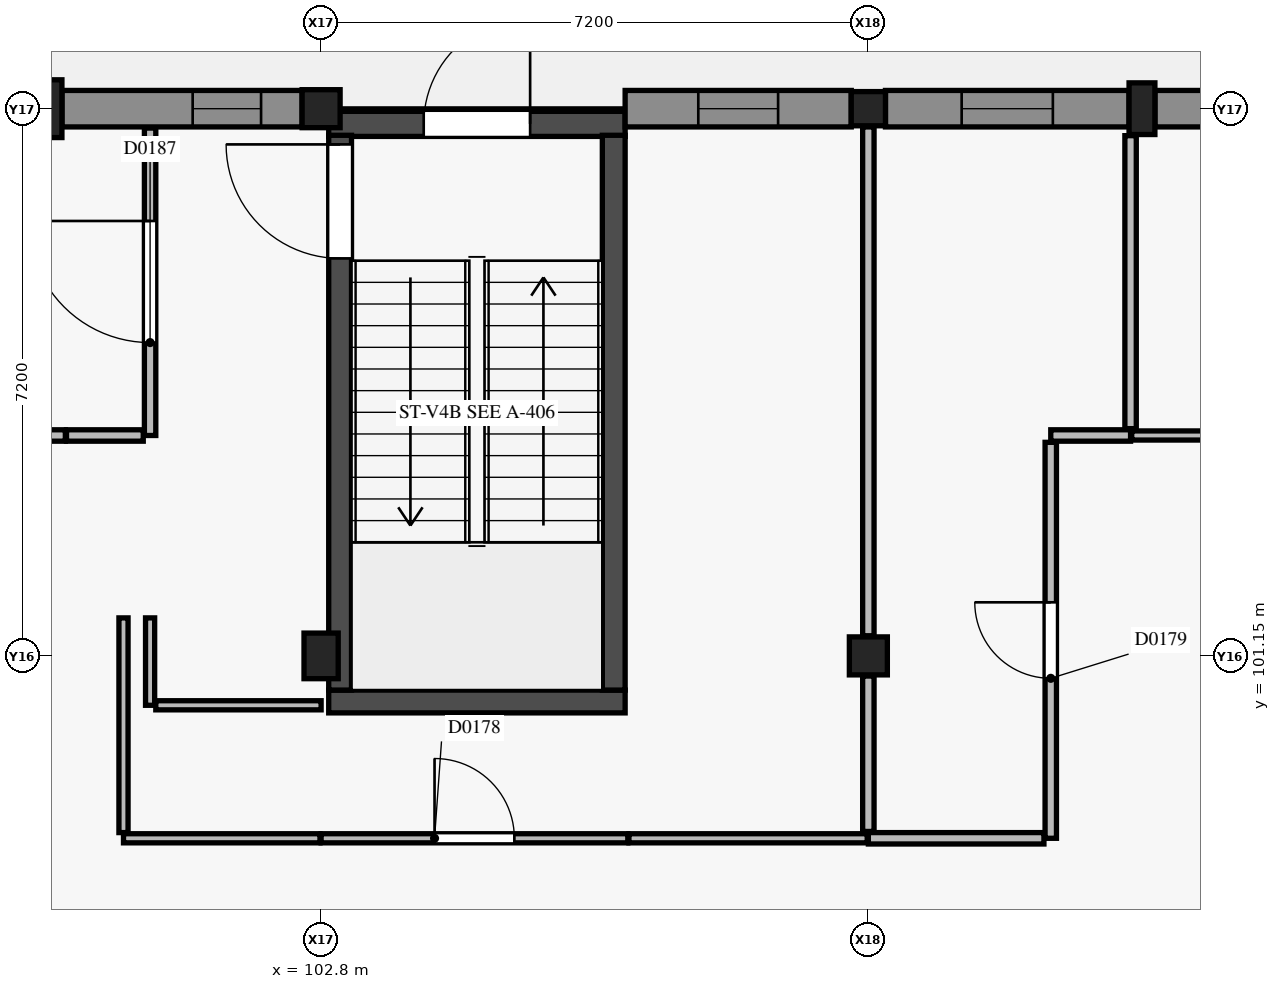
"""IFC4 building model, lengths in metres.
Left out: names, types, materials, properties, quantities, classifications, styles, units other than length and angle.
Written with IfcOpenShell. Run it as: python <this file> out.ifc"""

import sys

from ifc_helpers import new_model, si_unit, direction, frame, frame_2d, origin, origin_2d, place, context, subcontext, project, spatial, rectangle, circle, extrude, element, fill, save


model = new_model("IFC4")
c1 = context("Model", 3, precision=1e-05, world=origin(), true_north=direction((0.0, 1.0)))
c2 = subcontext(c1, "Body", "Model", "MODEL_VIEW")
j1 = project(units=[si_unit("LENGTHUNIT", "METRE"), si_unit("PLANEANGLEUNIT", "RADIAN")], contexts=[c1])
p1 = place(None, origin())
s1 = spatial("IfcSite", under=j1, at=p1, CompositionType="ELEMENT")
p2 = place(p1, origin())
s2 = spatial("IfcBuilding", under=s1, at=p2, CompositionType="ELEMENT")
p3 = place(p2, origin())
s3 = spatial("IfcBuildingStorey", under=s2, at=p3, CompositionType="ELEMENT", Elevation=0.0)
p4 = place(p3, frame((102.8, 101.15, 0.0), z_axis=(0.0, 0.0, 1.0), x_axis=(1.0, 0.0, 0.0)))
e1 = element("IfcColumn", 1, at=p4, inside=s3, PredefinedType="COLUMN", context=c2, shape_type="SweptSolid", body=[
    extrude(rectangle(XDim=0.45, YDim=0.6, at=origin_2d()), origin(), (0.0, 0.0, 1.0), 4.8),
])
p5 = place(p3, frame((102.8, 108.35, 0.0), z_axis=(0.0, 0.0, 1.0), x_axis=(1.0, 0.0, 0.0)))
e2 = element("IfcColumn", 2, at=p5, inside=s3, PredefinedType="COLUMN", context=c2, shape_type="SweptSolid", body=[
    extrude(circle(Radius=0.25, at=origin_2d()), origin(), (0.0, 0.0, 1.0), 4.8),
])
p6 = place(p3, frame((110.0, 101.15, 0.0), z_axis=(0.0, 0.0, 1.0), x_axis=(1.0, 0.0, 0.0)))
e3 = element("IfcColumn", 3, at=p6, inside=s3, PredefinedType="COLUMN", context=c2, shape_type="SweptSolid", body=[
    extrude(rectangle(XDim=0.5, YDim=0.5, at=origin_2d()), origin(), (0.0, 0.0, 1.0), 4.8),
])
p7 = place(p3, frame((110.0, 108.35, 0.0), z_axis=(0.0, 0.0, 1.0), x_axis=(1.0, 0.0, 0.0)))
e4 = element("IfcColumn", 4, at=p7, inside=s3, PredefinedType="COLUMN", context=c2, shape_type="SweptSolid", body=[
    extrude(rectangle(XDim=0.45, YDim=0.45, at=origin_2d()), origin(), (0.0, 0.0, 1.0), 4.8),
])
p8 = place(p3, frame((99.2, 108.35, 0.0), z_axis=(0.0, 0.0, 1.0), x_axis=(1.0, 0.0, 0.0)))
e5 = element("IfcColumn", 5, at=p8, inside=s3, PredefinedType="PILASTER", context=c2, shape_type="SweptSolid", body=[
    extrude(rectangle(XDim=0.38, YDim=0.76, at=origin_2d()), origin(), (0.0, 0.0, 1.0), 4.8),
])
p9 = place(p3, frame((113.6, 108.35, 0.0), z_axis=(0.0, 0.0, 1.0), x_axis=(1.0, 0.0, 0.0)))
e6 = element("IfcColumn", 6, at=p9, inside=s3, PredefinedType="PILASTER", context=c2, shape_type="SweptSolid", body=[
    extrude(rectangle(XDim=0.34, YDim=0.68, at=origin_2d()), origin(), (0.0, 0.0, 1.0), 4.8),
])
p10 = place(p3, frame((102.9, 100.55, 0.0), z_axis=(0.0, 0.0, 1.0), x_axis=(1.0, 0.0, 0.0)))
e7 = element("IfcWall", 7, at=p10, inside=s3, PredefinedType="SHEAR", context=c2, shape_type="SweptSolid", body=[
    extrude(rectangle(XDim=3.9, YDim=0.3, at=frame_2d((1.95, 0.0))), origin(), (0.0, 0.0, 1.0), 4.55),
])
p11 = place(p3, frame((102.9, 108.15, 0.0), z_axis=(0.0, 0.0, 1.0), x_axis=(1.0, 0.0, 0.0)))
e8 = element("IfcWall", 8, at=p11, inside=s3, PredefinedType="SHEAR", context=c2, shape_type="SweptSolid", body=[
    extrude(rectangle(XDim=3.9, YDim=0.33, at=frame_2d((1.95, 0.0))), origin(), (0.0, 0.0, 1.0), 4.55),
])
p12 = place(p11, frame((1.25, 0.0, 0.0)))
e9 = element("IfcOpeningElement", 9, at=p12, cuts=e8, PredefinedType="OPENING", context=c2, shape_type="SweptSolid", body=[
    extrude(rectangle(XDim=1.4, YDim=2.25, at=frame_2d((0.7, 1.125))), frame((0.0, 0.175, 0.0), z_axis=(0.0, -1.0, 0.0), x_axis=(1.0, 0.0, 0.0)), (0.0, 0.0, 1.0), 0.35),
])
p13 = place(p3, frame((103.05, 100.7, 0.0), z_axis=(0.0, 0.0, 1.0), x_axis=(0.0, 1.0, 0.0)))
e10 = element("IfcWall", 10, at=p13, inside=s3, PredefinedType="SHEAR", context=c2, shape_type="SweptSolid", body=[
    extrude(rectangle(XDim=7.3, YDim=0.3, at=frame_2d((3.65, 0.0))), origin(), (0.0, 0.0, 1.0), 4.55),
])
p14 = place(p13, frame((5.68, 0.0, 0.0)))
e11 = element("IfcOpeningElement", 11, at=p14, cuts=e10, PredefinedType="OPENING", context=c2, shape_type="SweptSolid", body=[
    extrude(rectangle(XDim=1.5, YDim=2.15, at=frame_2d((0.75, 1.075))), frame((0.0, 0.16, 0.0), z_axis=(0.0, -1.0, 0.0), x_axis=(1.0, 0.0, 0.0)), (0.0, 0.0, 1.0), 0.32),
])
p15 = place(p3, frame((106.65, 100.7, 0.0), z_axis=(0.0, 0.0, 1.0), x_axis=(0.0, 1.0, 0.0)))
e12 = element("IfcWall", 12, at=p15, inside=s3, PredefinedType="SHEAR", context=c2, shape_type="SweptSolid", body=[
    extrude(rectangle(XDim=7.3, YDim=0.3, at=frame_2d((3.65, 0.0))), origin(), (0.0, 0.0, 1.0), 4.55),
])
p16 = place(p3, frame((99.39, 108.35, 0.0), z_axis=(0.0, 0.0, 1.0), x_axis=(1.0, 0.0, 0.0)))
e13 = element("IfcWall", 13, at=p16, inside=s3, PredefinedType="SOLIDWALL", context=c2, shape_type="SweptSolid", body=[
    extrude(rectangle(XDim=3.16, YDim=0.48, at=frame_2d((1.58, 0.0))), origin(), (0.0, 0.0, 1.0), 3.73),
])
p17 = place(p16, frame((1.72, 0.0, 0.9)))
e14 = element("IfcOpeningElement", 14, at=p17, cuts=e13, PredefinedType="OPENING", context=c2, shape_type="SweptSolid", body=[
    extrude(rectangle(XDim=0.9, YDim=1.8, at=frame_2d((0.45, 0.9))), frame((0.0, 0.25, 0.0), z_axis=(0.0, -1.0, 0.0), x_axis=(1.0, 0.0, 0.0)), (0.0, 0.0, 1.0), 0.5),
])
p18 = place(p3, frame((106.8, 108.35, 0.0), z_axis=(0.0, 0.0, 1.0), x_axis=(1.0, 0.0, 0.0)))
e15 = element("IfcWall", 15, at=p18, inside=s3, PredefinedType="SOLIDWALL", context=c2, shape_type="SweptSolid", body=[
    extrude(rectangle(XDim=2.975, YDim=0.48, at=frame_2d((1.487, 0.0))), origin(), (0.0, 0.0, 1.0), 3.73),
])
p19 = place(p18, frame((0.962, 0.0, 0.9)))
e16 = element("IfcOpeningElement", 16, at=p19, cuts=e15, PredefinedType="OPENING", context=c2, shape_type="SweptSolid", body=[
    extrude(rectangle(XDim=1.05, YDim=1.8, at=frame_2d((0.525, 0.9))), frame((0.0, 0.25, 0.0), z_axis=(0.0, -1.0, 0.0), x_axis=(1.0, 0.0, 0.0)), (0.0, 0.0, 1.0), 0.5),
])
p20 = place(p3, frame((110.225, 108.35, 0.0), z_axis=(0.0, 0.0, 1.0), x_axis=(1.0, 0.0, 0.0)))
e17 = element("IfcWall", 17, at=p20, inside=s3, PredefinedType="SOLIDWALL", context=c2, shape_type="SweptSolid", body=[
    extrude(rectangle(XDim=3.205, YDim=0.48, at=frame_2d((1.603, 0.0))), origin(), (0.0, 0.0, 1.0), 3.73),
])
p21 = place(p20, frame((1.002, 0.0, 0.9)))
e18 = element("IfcOpeningElement", 18, at=p21, cuts=e17, PredefinedType="OPENING", context=c2, shape_type="SweptSolid", body=[
    extrude(rectangle(XDim=1.2, YDim=1.8, at=frame_2d((0.6, 0.9))), frame((0.0, 0.25, 0.0), z_axis=(0.0, -1.0, 0.0), x_axis=(1.0, 0.0, 0.0)), (0.0, 0.0, 1.0), 0.5),
])
p22 = place(p3, frame((113.77, 108.35, 0.0), z_axis=(0.0, 0.0, 1.0), x_axis=(1.0, 0.0, 0.0)))
e19 = element("IfcWall", 19, at=p22, inside=s3, PredefinedType="SOLIDWALL", context=c2, shape_type="SweptSolid", body=[
    extrude(rectangle(XDim=3.13, YDim=0.48, at=frame_2d((1.565, 0.0))), origin(), (0.0, 0.0, 1.0), 3.73),
])
p23 = place(p22, frame((0.865, 0.0, 0.9)))
e20 = element("IfcOpeningElement", 20, at=p23, cuts=e19, PredefinedType="OPENING", context=c2, shape_type="SweptSolid", body=[
    extrude(rectangle(XDim=1.4, YDim=1.8, at=frame_2d((0.7, 0.9))), frame((0.0, 0.25, 0.0), z_axis=(0.0, -1.0, 0.0), x_axis=(1.0, 0.0, 0.0)), (0.0, 0.0, 1.0), 0.5),
])
p24 = place(p3, frame((112.4, 104.05, 0.0), z_axis=(0.0, 0.0, 1.0), x_axis=(1.0, 0.0, 0.0)))
e21 = element("IfcWall", 21, at=p24, inside=s3, PredefinedType="PARTITIONING", context=c2, shape_type="SweptSolid", body=[
    extrude(rectangle(XDim=1.05, YDim=0.15, at=frame_2d((0.525, 0.0))), origin(), (0.0, 0.0, 1.0), 4.55),
])
p25 = place(p3, frame((112.4, 98.75, 0.0), z_axis=(0.0, 0.0, 1.0), x_axis=(0.0, 1.0, 0.0)))
e22 = element("IfcWall", 22, at=p25, inside=s3, PredefinedType="PARTITIONING", context=c2, shape_type="SweptSolid", body=[
    extrude(rectangle(XDim=5.21, YDim=0.15, at=frame_2d((2.605, 0.0))), origin(), (0.0, 0.0, 1.0), 4.055),
])
p26 = place(p25, frame((2.105, 0.0, 0.0)))
e23 = element("IfcOpeningElement", 23, at=p26, cuts=e22, PredefinedType="OPENING", context=c2, shape_type="SweptSolid", body=[
    extrude(rectangle(XDim=1.0, YDim=2.15, at=frame_2d((0.5, 1.075))), frame((0.0, 0.085, 0.0), z_axis=(0.0, -1.0, 0.0), x_axis=(1.0, 0.0, 0.0)), (0.0, 0.0, 1.0), 0.17),
])
p27 = place(p3, frame((110.0, 98.75, 0.0), z_axis=(0.0, 0.0, 1.0), x_axis=(1.0, 0.0, 0.0)))
e24 = element("IfcWall", 24, at=p27, inside=s3, PredefinedType="PARTITIONING", context=c2, shape_type="SweptSolid", body=[
    extrude(rectangle(XDim=2.31, YDim=0.15, at=frame_2d((1.155, 0.0))), origin(), (0.0, 0.0, 1.0), 3.885),
])
p28 = place(p3, frame((100.55, 104.05, 0.0), z_axis=(0.0, 0.0, 1.0), x_axis=(0.0, 1.0, 0.0)))
e25 = element("IfcWall", 25, at=p28, inside=s3, PredefinedType="PARTITIONING", context=c2, shape_type="SweptSolid", body=[
    extrude(rectangle(XDim=4.045, YDim=0.15, at=frame_2d((2.022, 0.0))), origin(), (0.0, 0.0, 1.0), 4.075),
])
p29 = place(p28, frame((1.222, 0.0, 0.0)))
e26 = element("IfcOpeningElement", 26, at=p29, cuts=e25, PredefinedType="OPENING", context=c2, shape_type="SweptSolid", body=[
    extrude(rectangle(XDim=1.6, YDim=2.25, at=frame_2d((0.8, 1.125))), frame((0.0, 0.085, 0.0), z_axis=(0.0, -1.0, 0.0), x_axis=(1.0, 0.0, 0.0)), (0.0, 0.0, 1.0), 0.17),
])
p30 = place(p3, frame((99.45, 104.05, 0.0), z_axis=(0.0, 0.0, 1.0), x_axis=(1.0, 0.0, 0.0)))
e27 = element("IfcWall", 27, at=p30, inside=s3, PredefinedType="PARTITIONING", context=c2, shape_type="SweptSolid", body=[
    extrude(rectangle(XDim=1.01, YDim=0.15, at=frame_2d((0.505, 0.0))), origin(), (0.0, 0.0, 1.0), 4.55),
])
p31 = place(p3, frame((95.6, 104.05, 0.0), z_axis=(0.0, 0.0, 1.0), x_axis=(1.0, 0.0, 0.0)))
e28 = element("IfcWall", 28, at=p31, inside=s3, PredefinedType="PARTITIONING", context=c2, shape_type="SweptSolid", body=[
    extrude(rectangle(XDim=3.835, YDim=0.15, at=frame_2d((1.917, 0.0))), origin(), (0.0, 0.0, 1.0), 3.885),
])
p32 = place(p3, frame((113.465, 104.05, 0.0), z_axis=(0.0, 0.0, 1.0), x_axis=(1.0, 0.0, 0.0)))
e29 = element("IfcWall", 29, at=p32, inside=s3, PredefinedType="PARTITIONING", context=c2, shape_type="SweptSolid", body=[
    extrude(rectangle(XDim=1.26, YDim=0.12, at=frame_2d((0.63, 0.0))), origin(), (0.0, 0.0, 1.0), 4.55),
])
p33 = place(p3, frame((100.55, 100.5, 0.0), z_axis=(0.0, 0.0, 1.0), x_axis=(0.0, 1.0, 0.0)))
e30 = element("IfcWall", 30, at=p33, inside=s3, PredefinedType="PARTITIONING", context=c2, shape_type="SweptSolid", body=[
    extrude(rectangle(XDim=1.15, YDim=0.12, at=frame_2d((0.575, 0.0))), origin(), (0.0, 0.0, 1.0), 3.955),
])
p34 = place(p3, frame((100.625, 100.5, 0.0), z_axis=(0.0, 0.0, 1.0), x_axis=(1.0, 0.0, 0.0)))
e31 = element("IfcWall", 31, at=p34, inside=s3, PredefinedType="PARTITIONING", context=c2, shape_type="SweptSolid", body=[
    extrude(rectangle(XDim=2.175, YDim=0.12, at=frame_2d((1.087, 0.0))), origin(), (0.0, 0.0, 1.0), 4.015),
])
p35 = place(p3, frame((106.85, 98.75, 0.0), z_axis=(0.0, 0.0, 1.0), x_axis=(1.0, 0.0, 0.0)))
e32 = element("IfcWall", 32, at=p35, inside=s3, PredefinedType="PARTITIONING", context=c2, shape_type="SweptSolid", body=[
    extrude(rectangle(XDim=3.135, YDim=0.12, at=frame_2d((1.567, 0.0))), origin(), (0.0, 0.0, 1.0), 3.885),
])
p36 = place(p3, frame((102.8, 98.75, 0.0), z_axis=(0.0, 0.0, 1.0), x_axis=(1.0, 0.0, 0.0)))
e33 = element("IfcWall", 33, at=p36, inside=s3, PredefinedType="PARTITIONING", context=c2, shape_type="SweptSolid", body=[
    extrude(rectangle(XDim=4.035, YDim=0.12, at=frame_2d((2.018, 0.0))), origin(), (0.0, 0.0, 1.0), 4.015),
])
p37 = place(p36, frame((1.492, 0.0, 0.0)))
e34 = element("IfcOpeningElement", 34, at=p37, cuts=e33, PredefinedType="OPENING", context=c2, shape_type="SweptSolid", body=[
    extrude(rectangle(XDim=1.05, YDim=2.15, at=frame_2d((0.525, 1.075))), frame((0.0, 0.07, 0.0), z_axis=(0.0, -1.0, 0.0), x_axis=(1.0, 0.0, 0.0)), (0.0, 0.0, 1.0), 0.14),
])
p38 = place(p3, frame((100.2, 98.75, 0.0), z_axis=(0.0, 0.0, 1.0), x_axis=(1.0, 0.0, 0.0)))
e35 = element("IfcWall", 35, at=p38, inside=s3, PredefinedType="PARTITIONING", context=c2, shape_type="SweptSolid", body=[
    extrude(rectangle(XDim=2.585, YDim=0.12, at=frame_2d((1.292, 0.0))), origin(), (0.0, 0.0, 1.0), 4.015),
])
p39 = place(p3, frame((100.2, 98.825, 0.0), z_axis=(0.0, 0.0, 1.0), x_axis=(0.0, 1.0, 0.0)))
e36 = element("IfcWall", 36, at=p39, inside=s3, PredefinedType="PARTITIONING", context=c2, shape_type="SweptSolid", body=[
    extrude(rectangle(XDim=2.825, YDim=0.12, at=frame_2d((1.413, 0.0))), origin(), (0.0, 0.0, 1.0), 3.955),
])
p40 = place(p3, frame((113.45, 104.14, 0.0), z_axis=(0.0, 0.0, 1.0), x_axis=(0.0, 1.0, 0.0)))
e37 = element("IfcWall", 37, at=p40, inside=s3, PredefinedType="PARTITIONING", context=c2, shape_type="SweptSolid", body=[
    extrude(rectangle(XDim=3.855, YDim=0.15, at=frame_2d((1.928, 0.0))), origin(), (0.0, 0.0, 1.0), 4.075),
])
p41 = place(p3, frame((110.0, 98.84, 0.0), z_axis=(0.0, 0.0, 1.0), x_axis=(0.0, 1.0, 0.0)))
e38 = element("IfcWall", 38, at=p41, inside=s3, PredefinedType="PARTITIONING", context=c2, shape_type="SweptSolid", body=[
    extrude(rectangle(XDim=2.045, YDim=0.15, at=frame_2d((1.022, 0.0))), origin(), (0.0, 0.0, 1.0), 3.885),
])
p42 = place(p3, frame((110.0, 101.415, 0.0), z_axis=(0.0, 0.0, 1.0), x_axis=(0.0, 1.0, 0.0)))
e39 = element("IfcWall", 39, at=p42, inside=s3, PredefinedType="PARTITIONING", context=c2, shape_type="SweptSolid", body=[
    extrude(rectangle(XDim=6.695, YDim=0.15, at=frame_2d((3.348, 0.0))), origin(), (0.0, 0.0, 1.0), 3.885),
])
p43 = place(p12, origin())
e40 = element("IfcDoor", 40, at=p43, inside=s3, OperationType="SINGLE_SWING_RIGHT", PredefinedType="DOOR", context=c2, shape_type="SweptSolid", body=[
    extrude(rectangle(XDim=1.4, YDim=2.25, at=frame_2d((0.7, 1.125))), frame((0.0, 0.025, 0.0), z_axis=(0.0, -1.0, 0.0), x_axis=(1.0, 0.0, 0.0)), (0.0, 0.0, 1.0), 0.05),
])
fill(e9, e40)
p44 = place(p17, origin())
e41 = element("IfcWindow", 41, at=p44, inside=s3, PartitioningType="SINGLE_PANEL", PredefinedType="WINDOW", context=c2, shape_type="SweptSolid", body=[
    extrude(rectangle(XDim=0.9, YDim=1.8, at=frame_2d((0.45, 0.9))), frame((0.0, 0.03, 0.0), z_axis=(0.0, -1.0, 0.0), x_axis=(1.0, 0.0, 0.0)), (0.0, 0.0, 1.0), 0.06),
])
fill(e14, e41)
p45 = place(p19, origin())
e42 = element("IfcWindow", 42, at=p45, inside=s3, PartitioningType="SINGLE_PANEL", PredefinedType="WINDOW", context=c2, shape_type="SweptSolid", body=[
    extrude(rectangle(XDim=1.05, YDim=1.8, at=frame_2d((0.525, 0.9))), frame((0.0, 0.03, 0.0), z_axis=(0.0, -1.0, 0.0), x_axis=(1.0, 0.0, 0.0)), (0.0, 0.0, 1.0), 0.06),
])
fill(e16, e42)
p46 = place(p21, origin())
e43 = element("IfcWindow", 43, at=p46, inside=s3, PartitioningType="SINGLE_PANEL", PredefinedType="WINDOW", context=c2, shape_type="SweptSolid", body=[
    extrude(rectangle(XDim=1.2, YDim=1.8, at=frame_2d((0.6, 0.9))), frame((0.0, 0.03, 0.0), z_axis=(0.0, -1.0, 0.0), x_axis=(1.0, 0.0, 0.0)), (0.0, 0.0, 1.0), 0.06),
])
fill(e18, e43)
p47 = place(p14, origin())
e44 = element("IfcDoor", 44, at=p47, inside=s3, OperationType="SINGLE_SWING_RIGHT", PredefinedType="DOOR", context=c2, shape_type="SweptSolid", body=[
    extrude(rectangle(XDim=1.5, YDim=2.15, at=frame_2d((0.75, 1.075))), frame((0.0, 0.025, 0.0), z_axis=(0.0, -1.0, 0.0), x_axis=(1.0, 0.0, 0.0)), (0.0, 0.0, 1.0), 0.05),
])
fill(e11, e44)
p48 = place(p37, origin())
e45 = element("IfcDoor", 45, at=p48, inside=s3, OperationType="SINGLE_SWING_LEFT", PredefinedType="DOOR", context=c2, shape_type="SweptSolid", body=[
    extrude(rectangle(XDim=1.05, YDim=2.15, at=frame_2d((0.525, 1.075))), frame((0.0, 0.025, 0.0), z_axis=(0.0, -1.0, 0.0), x_axis=(1.0, 0.0, 0.0)), (0.0, 0.0, 1.0), 0.05),
])
fill(e34, e45)
p49 = place(p26, origin())
e46 = element("IfcDoor", 46, at=p49, inside=s3, OperationType="SINGLE_SWING_RIGHT", PredefinedType="DOOR", context=c2, shape_type="SweptSolid", body=[
    extrude(rectangle(XDim=1.0, YDim=2.15, at=frame_2d((0.5, 1.075))), frame((0.0, 0.025, 0.0), z_axis=(0.0, -1.0, 0.0), x_axis=(1.0, 0.0, 0.0)), (0.0, 0.0, 1.0), 0.05),
])
fill(e23, e46)
p50 = place(p29, origin())
e47 = element("IfcDoor", 47, at=p50, inside=s3, OperationType="SINGLE_SWING_RIGHT", PredefinedType="DOOR", context=c2, shape_type="SweptSolid", body=[
    extrude(rectangle(XDim=1.6, YDim=2.25, at=frame_2d((0.8, 1.125))), frame((0.0, 0.025, 0.0), z_axis=(0.0, -1.0, 0.0), x_axis=(1.0, 0.0, 0.0)), (0.0, 0.0, 1.0), 0.05),
])
fill(e26, e47)
save(model, sys.argv[1])
